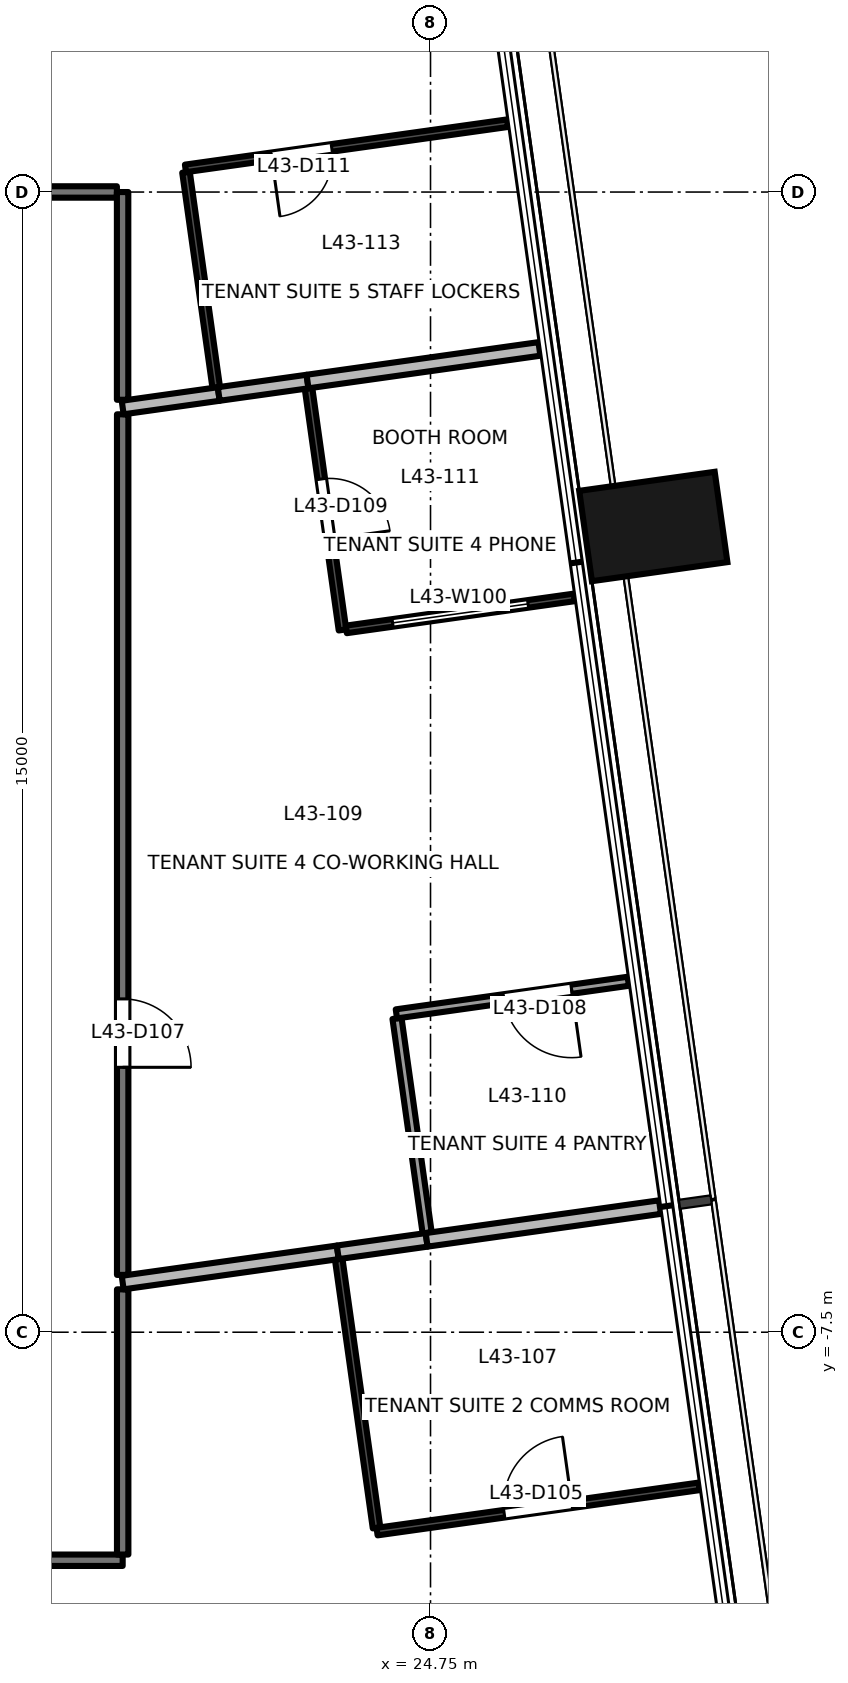
"""IFC4 building model, lengths in metres.
Left out: names, types, materials, properties, quantities, classifications, styles, units other than length and angle.
Written with IfcOpenShell. Run it as: python <this file> out.ifc"""

import sys

from ifc_helpers import new_model, si_unit, direction, frame, frame_2d, origin, origin_2d, place, context, subcontext, project, spatial, rectangle, extrude, element, fill, save


model = new_model("IFC4")
c1 = context("Model", 3, precision=1e-05, world=origin(), true_north=direction((0.0, 1.0)))
c2 = subcontext(c1, "Body", "Model", "MODEL_VIEW")
j1 = project(units=[si_unit("LENGTHUNIT", "METRE"), si_unit("PLANEANGLEUNIT", "RADIAN")], contexts=[c1])
p1 = place(None, origin())
s1 = spatial("IfcSite", under=j1, at=p1, CompositionType="ELEMENT")
p2 = place(p1, origin())
s2 = spatial("IfcBuilding", under=s1, at=p2, CompositionType="ELEMENT")
p3 = place(p2, frame((0.0, 0.0, 188.0)))
s3 = spatial("IfcBuildingStorey", under=s2, at=p3, CompositionType="ELEMENT", Elevation=188.0)
p4 = place(p3, frame((27.681, 3.1, -0.2), z_axis=(0.0, 0.0, 1.0), x_axis=(-0.139190384377, 0.990265639562, 0.0)))
e1 = element("IfcColumn", 1, at=p4, inside=s3, PredefinedType="COLUMN", context=c2, shape_type="SweptSolid", body=[
    extrude(rectangle(XDim=1.2, YDim=1.8, at=origin_2d()), origin(), (0.0, 0.0, 1.0), 3.9),
])
p5 = place(p3, frame((20.7, -10.5, 0.0), z_axis=(0.0, 0.0, 1.0), x_axis=(-1.0, 0.0, 0.0)))
e2 = element("IfcWall", 2, at=p5, inside=s3, PredefinedType="PARTITIONING", context=c2, shape_type="SweptSolid", body=[
    extrude(rectangle(XDim=7.251, YDim=0.15, at=frame_2d((3.625, 0.0))), origin(), (0.0, 0.0, 1.0), 3.1),
])
p6 = place(p3, frame((20.7, -6.936, 0.0), z_axis=(0.0, 0.0, 1.0), x_axis=(0.0, -1.0, 0.0)))
e3 = element("IfcWall", 3, at=p6, inside=s3, PredefinedType="PARTITIONING", context=c2, shape_type="SweptSolid", body=[
    extrude(rectangle(XDim=3.489, YDim=0.15, at=frame_2d((1.745, 0.0))), origin(), (0.0, 0.0, 1.0), 3.7),
])
p7 = place(p3, frame((20.7, 4.576, 0.0), z_axis=(0.0, 0.0, 1.0), x_axis=(0.0, -1.0, 0.0)))
e4 = element("IfcWall", 4, at=p7, inside=s3, PredefinedType="PARTITIONING", context=c2, shape_type="SweptSolid", body=[
    extrude(rectangle(XDim=11.322, YDim=0.15, at=frame_2d((5.661, 0.0))), origin(), (0.0, 0.0, 1.0), 3.25),
])
p8 = place(p7, frame((7.691, 0.0, 0.0)))
e5 = element("IfcOpeningElement", 5, at=p8, cuts=e4, PredefinedType="OPENING", context=c2, shape_type="SweptSolid", body=[
    extrude(rectangle(XDim=0.9, YDim=2.1, at=frame_2d((0.45, 1.05))), frame((0.0, 0.085, 0.0), z_axis=(0.0, -1.0, 0.0), x_axis=(1.0, 0.0, 0.0)), (0.0, 0.0, 1.0), 0.171),
])
p9 = place(p3, frame((18.0, 7.501, 0.0), z_axis=(0.0, 0.0, 1.0), x_axis=(1.0, 0.0, 0.0)))
e6 = element("IfcWall", 6, at=p9, inside=s3, PredefinedType="PARTITIONING", context=c2, shape_type="SweptSolid", body=[
    extrude(rectangle(XDim=2.624, YDim=0.15, at=frame_2d((1.312, 0.0))), origin(), (0.0, 0.0, 1.0), 3.7),
])
p10 = place(p3, frame((20.699, 7.5, 0.0), z_axis=(0.0, 0.0, 1.0), x_axis=(0.0, -1.0, 0.0)))
e7 = element("IfcWall", 7, at=p10, inside=s3, PredefinedType="PARTITIONING", context=c2, shape_type="SweptSolid", body=[
    extrude(rectangle(XDim=2.733, YDim=0.15, at=frame_2d((1.366, 0.0))), origin(), (0.0, 0.0, 1.0), 3.7),
])
p11 = place(p3, frame((23.542, -6.538, 0.0), z_axis=(0.0, 0.0, 1.0), x_axis=(0.139477964322, -0.990225175134, 0.0)))
e8 = element("IfcWall", 8, at=p11, inside=s3, PredefinedType="PARTITIONING", context=c2, shape_type="SweptSolid", body=[
    extrude(rectangle(XDim=3.571, YDim=0.1, at=frame_2d((1.785, 0.0))), origin(), (0.0, 0.0, 1.0), 3.7),
])
p12 = place(p3, frame((24.047, -10.123, 0.0), z_axis=(0.0, 0.0, 1.0), x_axis=(0.990283364174, 0.139064224876, 0.0)))
e9 = element("IfcWall", 9, at=p12, inside=s3, PredefinedType="PARTITIONING", context=c2, shape_type="SweptSolid", body=[
    extrude(rectangle(XDim=4.278, YDim=0.1, at=frame_2d((2.139, 0.0))), origin(), (0.0, 0.0, 1.0), 3.7),
])
p13 = place(p12, frame((1.689, 0.0, 0.0)))
e10 = element("IfcOpeningElement", 10, at=p13, cuts=e9, PredefinedType="OPENING", context=c2, shape_type="SweptSolid", body=[
    extrude(rectangle(XDim=0.9, YDim=2.1, at=frame_2d((0.45, 1.05))), frame((0.0, 0.061, 0.0), z_axis=(0.0, -1.0, 0.0), x_axis=(1.0, 0.0, 0.0)), (0.0, 0.0, 1.0), 0.121),
])
p14 = place(p3, frame((20.7, -6.847, 0.0), z_axis=(0.0, 0.0, 1.0), x_axis=(0.990258051292, 0.139244360214, 0.0)))
e11 = element("IfcWall", 11, at=p14, inside=s3, PredefinedType="PARTITIONING", context=c2, shape_type="SweptSolid", body=[
    extrude(rectangle(XDim=2.858, YDim=0.18, at=frame_2d((1.429, 0.0))), origin(), (0.0, 0.0, 1.0), 3.7),
])
p15 = place(p3, frame((23.53, -6.449, 0.0), z_axis=(0.0, 0.0, 1.0), x_axis=(0.990293977152, 0.138988628372, 0.0)))
e12 = element("IfcWall", 12, at=p15, inside=s3, PredefinedType="PARTITIONING", context=c2, shape_type="SweptSolid", body=[
    extrude(rectangle(XDim=1.18, YDim=0.18, at=frame_2d((0.59, 0.0))), origin(), (0.0, 0.0, 1.0), 3.7),
])
p16 = place(p3, frame((24.699, -6.285, 0.0), z_axis=(0.0, 0.0, 1.0), x_axis=(0.990293026317, 0.138995402899, 0.0)))
e13 = element("IfcWall", 13, at=p16, inside=s3, PredefinedType="PARTITIONING", context=c2, shape_type="SweptSolid", body=[
    extrude(rectangle(XDim=3.1, YDim=0.18, at=frame_2d((1.55, 0.0))), origin(), (0.0, 0.0, 1.0), 3.7),
])
p17 = place(p3, frame((24.309, -3.371, 0.0), z_axis=(0.0, 0.0, 1.0), x_axis=(0.139298147854, -0.990250486495, 0.0)))
e14 = element("IfcWall", 14, at=p17, inside=s3, PredefinedType="PARTITIONING", context=c2, shape_type="SweptSolid", body=[
    extrude(rectangle(XDim=2.85, YDim=0.12, at=frame_2d((1.425, 0.0))), origin(), (0.0, 0.0, 1.0), 3.25),
])
p18 = place(p3, frame((27.352, -2.883, 0.0), z_axis=(0.0, 0.0, 1.0), x_axis=(-0.990260846741, -0.139224478493, 0.0)))
e15 = element("IfcWall", 15, at=p18, inside=s3, PredefinedType="PARTITIONING", context=c2, shape_type="SweptSolid", body=[
    extrude(rectangle(XDim=3.081, YDim=0.12, at=frame_2d((1.541, 0.0))), origin(), (0.0, 0.0, 1.0), 3.7),
])
p19 = place(p18, frame((0.754, 0.0, 0.0)))
e16 = element("IfcOpeningElement", 16, at=p19, cuts=e15, PredefinedType="OPENING", context=c2, shape_type="SweptSolid", body=[
    extrude(rectangle(XDim=0.9, YDim=2.1, at=frame_2d((0.45, 1.05))), frame((0.0, 0.071, 0.0), z_axis=(0.0, -1.0, 0.0), x_axis=(1.0, 0.0, 0.0)), (0.0, 0.0, 1.0), 0.141),
])
p20 = place(p3, frame((23.145, 4.918, 0.0), z_axis=(0.0, 0.0, 1.0), x_axis=(0.139249005145, -0.990257398138, 0.0)))
e17 = element("IfcWall", 17, at=p20, inside=s3, PredefinedType="PARTITIONING", context=c2, shape_type="SweptSolid", body=[
    extrude(rectangle(XDim=3.21, YDim=0.1, at=frame_2d((1.605, 0.0))), origin(), (0.0, 0.0, 1.0), 3.25),
])
p21 = place(p20, frame((1.205, 0.0, 0.0)))
e18 = element("IfcOpeningElement", 18, at=p21, cuts=e17, PredefinedType="OPENING", context=c2, shape_type="SweptSolid", body=[
    extrude(rectangle(XDim=0.8, YDim=2.1, at=frame_2d((0.4, 1.05))), frame((0.0, 0.061, 0.0), z_axis=(0.0, -1.0, 0.0), x_axis=(1.0, 0.0, 0.0)), (0.0, 0.0, 1.0), 0.121),
])
p22 = place(p3, frame((23.642, 1.746, 0.0), z_axis=(0.0, 0.0, 1.0), x_axis=(0.990294755806, 0.138983080349, 0.0)))
e19 = element("IfcWall", 19, at=p22, inside=s3, PredefinedType="PARTITIONING", context=c2, shape_type="SweptSolid", body=[
    extrude(rectangle(XDim=3.028, YDim=0.1, at=frame_2d((1.514, 0.0))), origin(), (0.0, 0.0, 1.0), 3.7),
])
p23 = place(p22, frame((0.615, 0.0, 0.9)))
e20 = element("IfcOpeningElement", 20, at=p23, cuts=e19, PredefinedType="OPENING", context=c2, shape_type="SweptSolid", body=[
    extrude(rectangle(XDim=1.8, YDim=1.2, at=frame_2d((0.9, 0.6))), frame((0.0, 0.061, 0.0), z_axis=(0.0, -1.0, 0.0), x_axis=(1.0, 0.0, 0.0)), (0.0, 0.0, 1.0), 0.121),
])
p24 = place(p3, frame((20.7, 4.665, 0.0), z_axis=(0.0, 0.0, 1.0), x_axis=(0.99023431529, 0.139413058294, 0.0)))
e21 = element("IfcWall", 21, at=p24, inside=s3, PredefinedType="PARTITIONING", context=c2, shape_type="SweptSolid", body=[
    extrude(rectangle(XDim=1.277, YDim=0.18, at=frame_2d((0.638, 0.0))), origin(), (0.0, 0.0, 1.0), 3.25),
])
p25 = place(p3, frame((21.964, 4.843, 0.0), z_axis=(0.0, 0.0, 1.0), x_axis=(0.990277975586, 0.139102591888, 0.0)))
e22 = element("IfcWall", 22, at=p25, inside=s3, PredefinedType="PARTITIONING", context=c2, shape_type="SweptSolid", body=[
    extrude(rectangle(XDim=1.179, YDim=0.18, at=frame_2d((0.59, 0.0))), origin(), (0.0, 0.0, 1.0), 3.7),
])
p26 = place(p3, frame((23.132, 5.007, 0.0), z_axis=(0.0, 0.0, 1.0), x_axis=(0.990260846741, 0.139224478493, 0.0)))
e23 = element("IfcWall", 23, at=p26, inside=s3, PredefinedType="PARTITIONING", context=c2, shape_type="SweptSolid", body=[
    extrude(rectangle(XDim=3.081, YDim=0.18, at=frame_2d((1.541, 0.0))), origin(), (0.0, 0.0, 1.0), 3.7),
])
p27 = place(p3, frame((21.533, 7.761, 0.0), z_axis=(0.0, 0.0, 1.0), x_axis=(0.139150189669, -0.990271288443, 0.0)))
e24 = element("IfcWall", 24, at=p27, inside=s3, PredefinedType="PARTITIONING", context=c2, shape_type="SweptSolid", body=[
    extrude(rectangle(XDim=2.86, YDim=0.1, at=frame_2d((1.43, 0.0))), origin(), (0.0, 0.0, 1.0), 3.7),
])
p28 = place(p3, frame((25.764, 8.406, 0.0), z_axis=(0.0, 0.0, 1.0), x_axis=(-0.99028887957, -0.139024943805, 0.0)))
e25 = element("IfcWall", 25, at=p28, inside=s3, PredefinedType="PARTITIONING", context=c2, shape_type="SweptSolid", body=[
    extrude(rectangle(XDim=4.28, YDim=0.1, at=frame_2d((2.14, 0.0))), origin(), (0.0, 0.0, 1.0), 3.7),
])
p29 = place(p28, frame((2.336, 0.0, 0.0)))
e26 = element("IfcOpeningElement", 26, at=p29, cuts=e25, PredefinedType="OPENING", context=c2, shape_type="SweptSolid", body=[
    extrude(rectangle(XDim=0.8, YDim=2.1, at=frame_2d((0.4, 1.05))), frame((0.0, 0.061, 0.0), z_axis=(0.0, -1.0, 0.0), x_axis=(1.0, 0.0, 0.0)), (0.0, 0.0, 1.0), 0.121),
])
p30 = place(p13, origin())
e27 = element("IfcDoor", 27, at=p30, inside=s3, OperationType="SINGLE_SWING_RIGHT", PredefinedType="DOOR", context=c2, shape_type="SweptSolid", body=[
    extrude(rectangle(XDim=0.9, YDim=2.1, at=frame_2d((0.45, 1.05))), frame((0.0, 0.025, 0.0), z_axis=(0.0, -1.0, 0.0), x_axis=(1.0, 0.0, 0.0)), (0.0, 0.0, 1.0), 0.05),
])
fill(e10, e27)
p31 = place(p8, origin())
e28 = element("IfcDoor", 28, at=p31, inside=s3, OperationType="SINGLE_SWING_RIGHT", PredefinedType="DOOR", context=c2, shape_type="SweptSolid", body=[
    extrude(rectangle(XDim=0.9, YDim=2.1, at=frame_2d((0.45, 1.05))), frame((0.0, 0.025, 0.0), z_axis=(0.0, -1.0, 0.0), x_axis=(1.0, 0.0, 0.0)), (0.0, 0.0, 1.0), 0.05),
])
fill(e5, e28)
p32 = place(p19, origin())
e29 = element("IfcDoor", 29, at=p32, inside=s3, OperationType="SINGLE_SWING_LEFT", PredefinedType="DOOR", context=c2, shape_type="SweptSolid", body=[
    extrude(rectangle(XDim=0.9, YDim=2.1, at=frame_2d((0.45, 1.05))), frame((0.0, 0.025, 0.0), z_axis=(0.0, -1.0, 0.0), x_axis=(1.0, 0.0, 0.0)), (0.0, 0.0, 1.0), 0.05),
])
fill(e16, e29)
p33 = place(p21, origin())
e30 = element("IfcDoor", 30, at=p33, inside=s3, OperationType="SINGLE_SWING_RIGHT", PredefinedType="DOOR", context=c2, shape_type="SweptSolid", body=[
    extrude(rectangle(XDim=0.8, YDim=2.1, at=frame_2d((0.4, 1.05))), frame((0.0, 0.025, 0.0), z_axis=(0.0, -1.0, 0.0), x_axis=(1.0, 0.0, 0.0)), (0.0, 0.0, 1.0), 0.05),
])
fill(e18, e30)
p34 = place(p29, origin())
e31 = element("IfcDoor", 31, at=p34, inside=s3, OperationType="SINGLE_SWING_RIGHT", PredefinedType="DOOR", context=c2, shape_type="SweptSolid", body=[
    extrude(rectangle(XDim=0.8, YDim=2.1, at=frame_2d((0.4, 1.05))), frame((0.0, 0.025, 0.0), z_axis=(0.0, -1.0, 0.0), x_axis=(1.0, 0.0, 0.0)), (0.0, 0.0, 1.0), 0.05),
])
fill(e26, e31)
p35 = place(p23, origin())
e32 = element("IfcWindow", 32, at=p35, inside=s3, PartitioningType="SINGLE_PANEL", PredefinedType="WINDOW", context=c2, shape_type="SweptSolid", body=[
    extrude(rectangle(XDim=1.8, YDim=1.2, at=frame_2d((0.9, 0.6))), frame((0.0, 0.03, 0.0), z_axis=(0.0, -1.0, 0.0), x_axis=(1.0, 0.0, 0.0)), (0.0, 0.0, 1.0), 0.06),
])
fill(e20, e32)
save(model, sys.argv[1])
